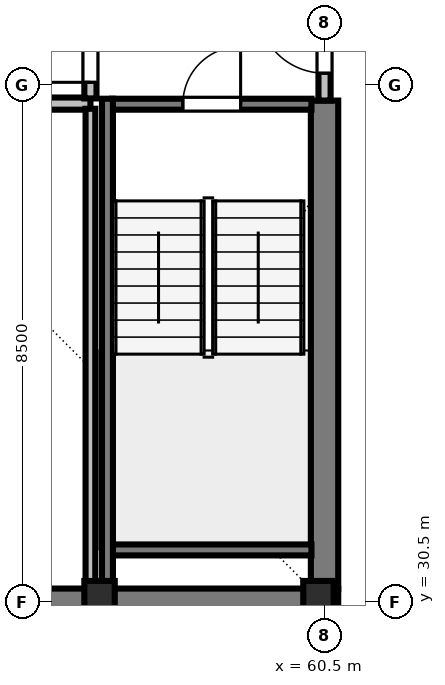
"""IFC4 building model, lengths in metres.
Left out: names, types, materials, properties, quantities, classifications, styles, units other than length and angle.
Written with IfcOpenShell. Run it as: python <this file> out.ifc"""

import sys

from ifc_helpers import new_model, si_unit, direction, frame, frame_2d, origin, origin_2d, place, context, subcontext, project, spatial, rectangle, i_section, extrude, element, fill, save


model = new_model("IFC4")
c1 = context("Model", 3, precision=1e-05, world=origin(), true_north=direction((0.0, 1.0)))
c2 = subcontext(c1, "Body", "Model", "MODEL_VIEW")
j1 = project(units=[si_unit("LENGTHUNIT", "METRE"), si_unit("PLANEANGLEUNIT", "RADIAN")], contexts=[c1])
p1 = place(None, origin())
s1 = spatial("IfcSite", under=j1, at=p1, CompositionType="ELEMENT")
p2 = place(p1, origin())
s2 = spatial("IfcBuilding", under=s1, at=p2, CompositionType="ELEMENT")
p3 = place(p2, frame((0.0, 0.0, 280.5)))
s3 = spatial("IfcBuildingStorey", under=s2, at=p3, CompositionType="ELEMENT", Elevation=280.5)
for number, where, z_axis, x_axis in (
    (1, (56.8, 30.6, 0.0), (0.0, 0.0, 1.0), (1.0, 0.0, 0.0)),
    (2, (60.4, 30.6, 0.0), (0.0, 0.0, 1.0), (1.0, 0.0, 0.0)),
):
    element("IfcColumn", number, at=place(p3, frame(where, z_axis=z_axis, x_axis=x_axis)), inside=s3, PredefinedType="COLUMN", context=c2, shape_type="SweptSolid", body=[
        extrude(i_section(OverallWidth=0.5, OverallDepth=0.5, WebThickness=0.028, FlangeThickness=0.045, at=origin_2d()), origin(), (0.0, 0.0, 1.0), 3.5),
    ])
p4 = place(p3, frame((43.275, 30.5, 0.0), z_axis=(0.0, 0.0, 1.0), x_axis=(1.0, 0.0, 0.0)))
e3 = element("IfcWall", 3, at=p4, inside=s3, PredefinedType="SHEAR", context=c2, shape_type="SweptSolid", body=[
    extrude(rectangle(XDim=17.45, YDim=0.45, at=frame_2d((8.725, 0.0))), origin(), (0.0, 0.0, 1.0), 3.29),
])
p5 = place(p3, frame((60.5, 30.715, 0.0), z_axis=(0.0, 0.0, 1.0), x_axis=(0.0, 1.0, 0.0)))
e4 = element("IfcWall", 4, at=p5, inside=s3, PredefinedType="SHEAR", context=c2, shape_type="SweptSolid", body=[
    extrude(rectangle(XDim=8.035, YDim=0.45, at=frame_2d((4.018, 0.0))), origin(), (0.0, 0.0, 1.0), 3.29),
])
p6 = place(p3, frame((53.7, 38.7, 0.0), z_axis=(0.0, 0.0, 1.0), x_axis=(1.0, 0.0, 0.0)))
e5 = element("IfcWall", 5, at=p6, inside=s3, PredefinedType="SOLIDWALL", context=c2, shape_type="SweptSolid", body=[
    extrude(rectangle(XDim=2.95, YDim=0.2, at=frame_2d((1.475, 0.0))), origin(), (0.0, 0.0, 1.0), 3.29),
])
p7 = place(p3, frame((60.5, 38.75, 0.0), z_axis=(0.0, 0.0, 1.0), x_axis=(0.0, 1.0, 0.0)))
e6 = element("IfcWall", 6, at=p7, inside=s3, PredefinedType="SOLIDWALL", context=c2, shape_type="SweptSolid", body=[
    extrude(rectangle(XDim=2.05, YDim=0.2, at=frame_2d((1.025, 0.0))), origin(), (0.0, 0.0, 1.0), 3.29),
])
p8 = place(p7, frame((0.45, 0.0, 0.0)))
e7 = element("IfcOpeningElement", 7, at=p8, cuts=e6, PredefinedType="OPENING", context=c2, shape_type="SweptSolid", body=[
    extrude(rectangle(XDim=1.1, YDim=2.15, at=frame_2d((0.55, 1.075))), frame((0.0, 0.11, 0.0), z_axis=(0.0, -1.0, 0.0), x_axis=(1.0, 0.0, 0.0)), (0.0, 0.0, 1.0), 0.22),
])
p9 = place(p3, frame((56.65, 38.785, 0.0), z_axis=(0.0, 0.0, 1.0), x_axis=(0.0, 1.0, 0.0)))
e8 = element("IfcWall", 8, at=p9, inside=s3, PredefinedType="SOLIDWALL", context=c2, shape_type="SweptSolid", body=[
    extrude(rectangle(XDim=4.865, YDim=0.2, at=frame_2d((2.433, 0.0))), origin(), (0.0, 0.0, 1.0), 3.29),
])
p10 = place(p9, frame((0.265, 0.0, 0.0)))
e9 = element("IfcOpeningElement", 9, at=p10, cuts=e8, PredefinedType="OPENING", context=c2, shape_type="SweptSolid", body=[
    extrude(rectangle(XDim=1.0, YDim=2.15, at=frame_2d((0.5, 1.075))), frame((0.0, 0.11, 0.0), z_axis=(0.0, -1.0, 0.0), x_axis=(1.0, 0.0, 0.0)), (0.0, 0.0, 1.0), 0.22),
])
p11 = place(p3, frame((56.65, 30.71, 0.0), z_axis=(0.0, 0.0, 1.0), x_axis=(0.0, 1.0, 0.0)))
e10 = element("IfcWall", 10, at=p11, inside=s3, PredefinedType="PARTITIONING", context=c2, shape_type="SweptSolid", body=[
    extrude(rectangle(XDim=7.905, YDim=0.16, at=frame_2d((3.953, 0.0))), origin(), (0.0, 0.0, 1.0), 3.29),
])
p12 = place(p3, frame((57.005, 38.69, 0.0), z_axis=(0.0, 0.0, 1.0), x_axis=(1.0, 0.0, 0.0)))
e11 = element("IfcWall", 11, at=p12, inside=s3, PredefinedType="SOLIDWALL", context=c2, shape_type="SweptSolid", body=[
    extrude(rectangle(XDim=3.28, YDim=0.18, at=frame_2d((1.64, 0.0))), origin(), (0.0, 0.0, 1.0), 3.29),
])
p13 = place(p12, frame((1.165, 0.0, 0.0)))
e12 = element("IfcOpeningElement", 12, at=p13, cuts=e11, PredefinedType="OPENING", context=c2, shape_type="SweptSolid", body=[
    extrude(rectangle(XDim=0.95, YDim=2.15, at=frame_2d((0.475, 1.075))), frame((0.0, 0.1, 0.0), z_axis=(0.0, -1.0, 0.0), x_axis=(1.0, 0.0, 0.0)), (0.0, 0.0, 1.0), 0.2),
])
p14 = place(p3, frame((57.005, 31.36, 0.0), z_axis=(0.0, 0.0, 1.0), x_axis=(1.0, 0.0, 0.0)))
e13 = element("IfcWall", 13, at=p14, inside=s3, PredefinedType="SOLIDWALL", context=c2, shape_type="SweptSolid", body=[
    extrude(rectangle(XDim=3.28, YDim=0.18, at=frame_2d((1.64, 0.0))), origin(), (0.0, 0.0, 1.0), 3.29),
])
p15 = place(p3, frame((56.93, 38.78, 0.0), z_axis=(0.0, 0.0, 1.0), x_axis=(0.0, -1.0, 0.0)))
e14 = element("IfcWall", 14, at=p15, inside=s3, PredefinedType="SOLIDWALL", context=c2, shape_type="SweptSolid", body=[
    extrude(rectangle(XDim=8.067, YDim=0.18, at=frame_2d((4.034, 0.0))), origin(), (0.0, 0.0, 1.0), 3.29),
])
p16 = place(p8, origin())
e15 = element("IfcDoor", 15, at=p16, inside=s3, OperationType="SINGLE_SWING_RIGHT", PredefinedType="DOOR", context=c2, shape_type="SweptSolid", body=[
    extrude(rectangle(XDim=1.1, YDim=2.15, at=frame_2d((0.55, 1.075))), frame((0.0, 0.025, 0.0), z_axis=(0.0, -1.0, 0.0), x_axis=(1.0, 0.0, 0.0)), (0.0, 0.0, 1.0), 0.05),
])
fill(e7, e15)
p17 = place(p10, origin())
e16 = element("IfcDoor", 16, at=p17, inside=s3, OperationType="SINGLE_SWING_LEFT", PredefinedType="DOOR", context=c2, shape_type="SweptSolid", body=[
    extrude(rectangle(XDim=1.0, YDim=2.15, at=frame_2d((0.5, 1.075))), frame((0.0, 0.025, 0.0), z_axis=(0.0, -1.0, 0.0), x_axis=(1.0, 0.0, 0.0)), (0.0, 0.0, 1.0), 0.05),
])
fill(e9, e16)
p18 = place(p13, origin())
e17 = element("IfcDoor", 17, at=p18, inside=s3, OperationType="SINGLE_SWING_RIGHT", PredefinedType="DOOR", context=c2, shape_type="SweptSolid", body=[
    extrude(rectangle(XDim=0.95, YDim=2.15, at=frame_2d((0.475, 1.075))), frame((0.0, 0.025, 0.0), z_axis=(0.0, -1.0, 0.0), x_axis=(1.0, 0.0, 0.0)), (0.0, 0.0, 1.0), 0.05),
])
fill(e12, e17)
save(model, sys.argv[1])
